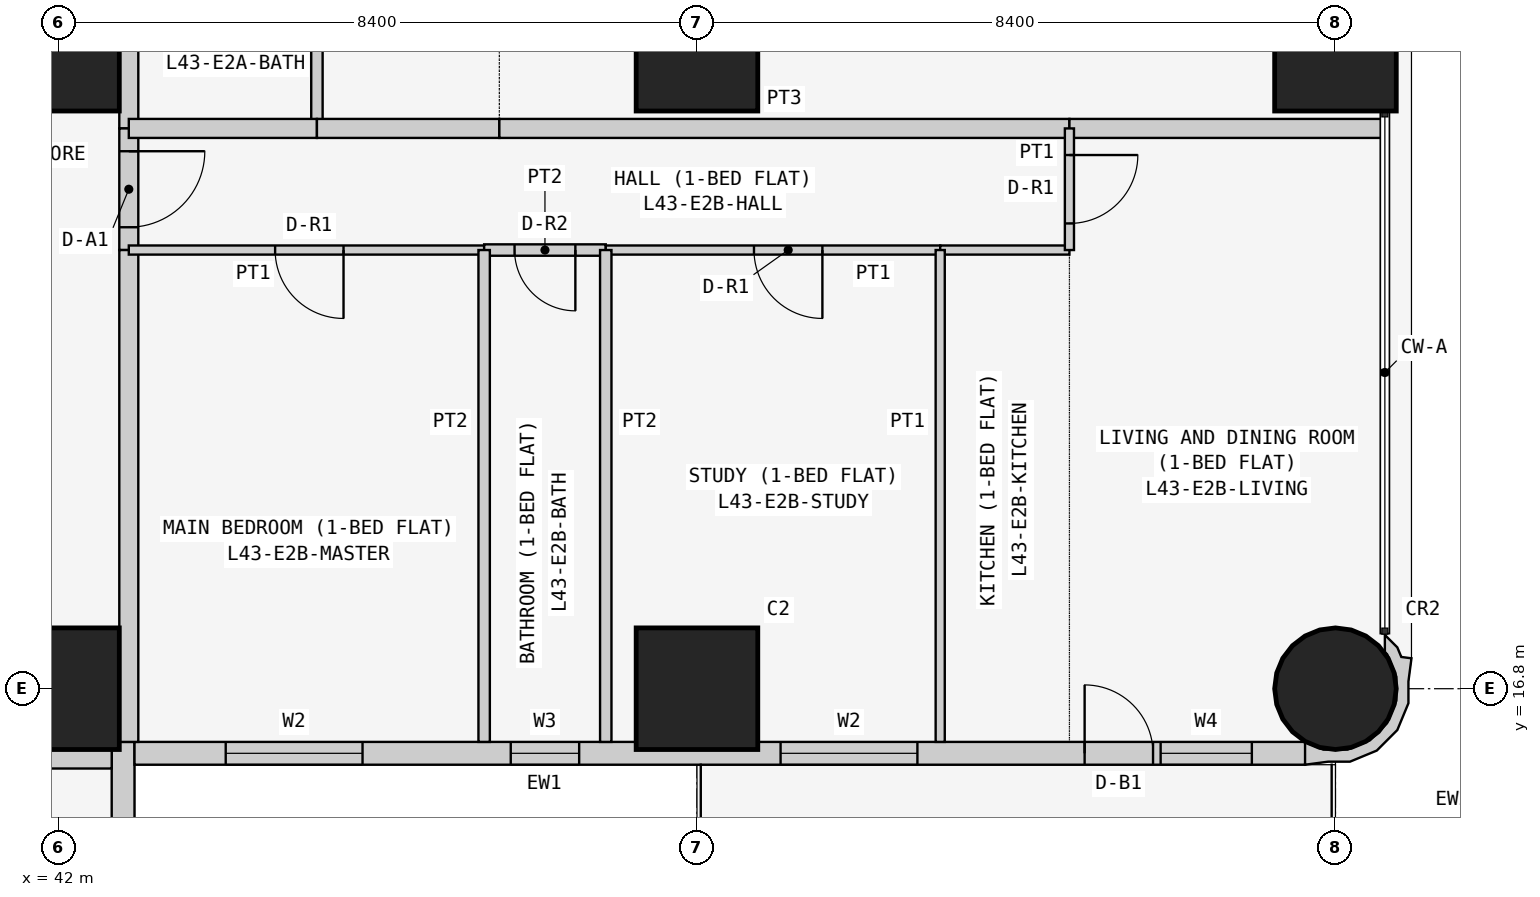
"""IFC4 building model, lengths in metres.
Left out: names, types, materials, properties, quantities, classifications, styles, units other than length and angle.
Written with IfcOpenShell. Run it as: python <this file> out.ifc"""

import sys

from ifc_helpers import new_model, si_unit, direction, frame, frame_2d, origin, origin_2d, place, context, subcontext, project, spatial, polyline, rectangle, circle, outline, extrude, element, fill, save


model = new_model("IFC4")
c1 = context("Model", 3, precision=1e-05, world=origin(), true_north=direction((0.0, 1.0)))
c2 = subcontext(c1, "Body", "Model", "MODEL_VIEW")
j1 = project(units=[si_unit("LENGTHUNIT", "METRE"), si_unit("PLANEANGLEUNIT", "RADIAN")], contexts=[c1])
p1 = place(None, origin())
s1 = spatial("IfcSite", under=j1, at=p1, CompositionType="ELEMENT")
p2 = place(p1, origin())
s2 = spatial("IfcBuilding", under=s1, at=p2, CompositionType="ELEMENT")
p3 = place(p2, frame((0.0, 0.0, 166.5)))
s3 = spatial("IfcBuildingStorey", under=s2, at=p3, CompositionType="ELEMENT", Elevation=166.5)
for number, where, z_axis, x_axis in (
    (1, (42.0, 16.8, 0.0), (0.0, 0.0, 1.0), (1.0, 0.0, 0.0)),
    (2, (42.0, 25.2, 0.0), (0.0, 0.0, 1.0), (1.0, 0.0, 0.0)),
    (3, (50.4, 16.8, 0.0), (0.0, 0.0, 1.0), (1.0, 0.0, 0.0)),
    (4, (50.4, 25.2, 0.0), (0.0, 0.0, 1.0), (1.0, 0.0, 0.0)),
):
    element("IfcColumn", number, at=place(p3, frame(where, z_axis=z_axis, x_axis=x_axis)), inside=s3, PredefinedType="COLUMN", context=c2, shape_type="SweptSolid", body=[
        extrude(rectangle(XDim=1.6, YDim=1.6, at=origin_2d()), origin(), (0.0, 0.0, 1.0), 3.6),
    ])
p4 = place(p3, frame((58.8, 16.8, 0.0), z_axis=(0.0, 0.0, 1.0), x_axis=(1.0, 0.0, 0.0)))
e5 = element("IfcColumn", 5, at=p4, inside=s3, PredefinedType="COLUMN", context=c2, shape_type="SweptSolid", body=[
    extrude(circle(Radius=0.8, at=origin_2d()), origin(), (0.0, 0.0, 1.0), 3.6),
])
p5 = place(p3, frame((58.8, 25.2, 0.0), z_axis=(0.0, 0.0, 1.0), x_axis=(1.0, 0.0, 0.0)))
e6 = element("IfcColumn", 6, at=p5, inside=s3, PredefinedType="COLUMN", context=c2, shape_type="SweptSolid", body=[
    extrude(rectangle(XDim=1.6, YDim=1.6, at=origin_2d()), origin(), (0.0, 0.0, 1.0), 3.6),
])
p6 = place(p3, frame((42.85, 8.8, 0.0), z_axis=(0.0, 0.0, 1.0), x_axis=(0.0, 1.0, 0.0)))
e7 = element("IfcWall", 7, at=p6, inside=s3, PredefinedType="SOLIDWALL", context=c2, shape_type="SweptSolid", body=[
    extrude(rectangle(XDim=7.3, YDim=0.3, at=frame_2d((3.65, 0.0))), origin(), (0.0, 0.0, 1.0), 3.45),
])
p7 = place(p6, frame((3.1, 0.0, 0.9)))
e8 = element("IfcOpeningElement", 8, at=p7, cuts=e7, PredefinedType="OPENING", context=c2, shape_type="SweptSolid", body=[
    extrude(rectangle(XDim=2.4, YDim=1.5, at=frame_2d((1.2, 0.75))), frame((0.0, 0.16, 0.0), z_axis=(0.0, -1.0, 0.0), x_axis=(1.0, 0.0, 0.0)), (0.0, 0.0, 1.0), 0.32),
])
p8 = place(p6, frame((0.75, 0.0, 0.9)))
e9 = element("IfcOpeningElement", 9, at=p8, cuts=e7, PredefinedType="OPENING", context=c2, shape_type="SweptSolid", body=[
    extrude(rectangle(XDim=1.2, YDim=1.5, at=frame_2d((0.6, 0.75))), frame((0.0, 0.16, 0.0), z_axis=(0.0, -1.0, 0.0), x_axis=(1.0, 0.0, 0.0)), (0.0, 0.0, 1.0), 0.32),
])
p9 = place(p3, frame((43.0, 15.95, 0.0), z_axis=(0.0, 0.0, 1.0), x_axis=(1.0, 0.0, 0.0)))
e10 = element("IfcWall", 10, at=p9, inside=s3, PredefinedType="SOLIDWALL", context=c2, shape_type="SweptSolid", body=[
    extrude(rectangle(XDim=15.4, YDim=0.3, at=frame_2d((7.7, 0.0))), origin(), (0.0, 0.0, 1.0), 3.45),
])
p10 = place(p9, frame((1.2, 0.0, 0.9)))
e11 = element("IfcOpeningElement", 11, at=p10, cuts=e10, PredefinedType="OPENING", context=c2, shape_type="SweptSolid", body=[
    extrude(rectangle(XDim=1.8, YDim=1.5, at=frame_2d((0.9, 0.75))), frame((0.0, 0.16, 0.0), z_axis=(0.0, -1.0, 0.0), x_axis=(1.0, 0.0, 0.0)), (0.0, 0.0, 1.0), 0.32),
])
p11 = place(p9, frame((4.95, 0.0, 1.5)))
e12 = element("IfcOpeningElement", 12, at=p11, cuts=e10, PredefinedType="OPENING", context=c2, shape_type="SweptSolid", body=[
    extrude(rectangle(XDim=0.9, YDim=0.7, at=frame_2d((0.45, 0.35))), frame((0.0, 0.16, 0.0), z_axis=(0.0, -1.0, 0.0), x_axis=(1.0, 0.0, 0.0)), (0.0, 0.0, 1.0), 0.32),
])
p12 = place(p9, frame((8.5, 0.0, 0.9)))
e13 = element("IfcOpeningElement", 13, at=p12, cuts=e10, PredefinedType="OPENING", context=c2, shape_type="SweptSolid", body=[
    extrude(rectangle(XDim=1.8, YDim=1.5, at=frame_2d((0.9, 0.75))), frame((0.0, 0.16, 0.0), z_axis=(0.0, -1.0, 0.0), x_axis=(1.0, 0.0, 0.0)), (0.0, 0.0, 1.0), 0.32),
])
p13 = place(p9, frame((12.5, 0.0, 0.0)))
e14 = element("IfcOpeningElement", 14, at=p13, cuts=e10, PredefinedType="OPENING", context=c2, shape_type="SweptSolid", body=[
    extrude(rectangle(XDim=0.9, YDim=2.4, at=frame_2d((0.45, 1.2))), frame((0.0, 0.16, 0.0), z_axis=(0.0, -1.0, 0.0), x_axis=(1.0, 0.0, 0.0)), (0.0, 0.0, 1.0), 0.32),
])
p14 = place(p9, frame((13.5, 0.0, 0.9)))
e15 = element("IfcOpeningElement", 15, at=p14, cuts=e10, PredefinedType="OPENING", context=c2, shape_type="SweptSolid", body=[
    extrude(rectangle(XDim=1.2, YDim=1.5, at=frame_2d((0.6, 0.75))), frame((0.0, 0.16, 0.0), z_axis=(0.0, -1.0, 0.0), x_axis=(1.0, 0.0, 0.0)), (0.0, 0.0, 1.0), 0.32),
])
p15 = place(p3, frame((58.473, 15.983, 0.0), z_axis=(0.0, 0.0, 1.0), x_axis=(0.93923434088, -0.343276641956, 0.0)))
e16 = element("IfcWall", 16, at=p15, inside=s3, PredefinedType="SOLIDWALL", context=c2, shape_type="SweptSolid", body=[
    extrude(outline(polyline([(0.828, 1.599), (0.697, 1.569), (0.604, 1.67), (0.394, 1.767), (0.471, 1.556), (0.508, 1.539), (0.724, 1.304), (0.834, 1.005), (0.82, 0.686), (0.686, 0.397), (0.451, 0.182), (0.152, 0.073), (-0.116, 0.084), (-0.127, 0.078), (-0.146, 0.071), (-0.006, -0.197), (0.266, -0.055), (0.535, 0.044), (0.817, 0.302), (0.978, 0.648), (0.994, 1.03), (0.895, 1.3), (0.828, 1.599)])), origin(), (0.0, 0.0, 1.0), 3.45),
])
p16 = place(p3, frame((42.925, 26.8, 0.0), z_axis=(0.0, 0.0, 1.0), x_axis=(0.0, -1.0, 0.0)))
e17 = element("IfcWall", 17, at=p16, inside=s3, PredefinedType="PARTITIONING", context=c2, shape_type="SweptSolid", body=[
    extrude(rectangle(XDim=2.629, YDim=0.25, at=frame_2d((1.314, 0.0))), origin(), (0.0, 0.0, 1.0), 3.45),
])
p17 = place(p3, frame((42.925, 24.171, 0.0), z_axis=(0.0, 0.0, 1.0), x_axis=(0.0, -1.0, 0.0)))
e18 = element("IfcWall", 18, at=p17, inside=s3, PredefinedType="PARTITIONING", context=c2, shape_type="SweptSolid", body=[
    extrude(rectangle(XDim=1.6, YDim=0.25, at=frame_2d((0.8, 0.0))), origin(), (0.0, 0.0, 1.0), 3.45),
])
p18 = place(p17, frame((0.3, 0.0, 0.0)))
e19 = element("IfcOpeningElement", 19, at=p18, cuts=e18, PredefinedType="OPENING", context=c2, shape_type="SweptSolid", body=[
    extrude(rectangle(XDim=1.0, YDim=2.1, at=frame_2d((0.5, 1.05))), frame((0.0, 0.135, 0.0), z_axis=(0.0, -1.0, 0.0), x_axis=(1.0, 0.0, 0.0)), (0.0, 0.0, 1.0), 0.27),
])
p19 = place(p3, frame((42.925, 22.571, 0.0), z_axis=(0.0, 0.0, 1.0), x_axis=(0.0, -1.0, 0.0)))
e20 = element("IfcWall", 20, at=p19, inside=s3, PredefinedType="PARTITIONING", context=c2, shape_type="SweptSolid", body=[
    extrude(rectangle(XDim=6.471, YDim=0.25, at=frame_2d((3.235, 0.0))), origin(), (0.0, 0.0, 1.0), 3.45),
])
p20 = place(p3, frame((42.7, 15.875, 0.0), z_axis=(0.0, 0.0, 1.0), x_axis=(-1.0, 0.0, 0.0)))
e21 = element("IfcWall", 21, at=p20, inside=s3, PredefinedType="PARTITIONING", context=c2, shape_type="SweptSolid", body=[
    extrude(rectangle(XDim=6.871, YDim=0.25, at=frame_2d((3.436, 0.0))), origin(), (0.0, 0.0, 1.0), 3.45),
])
p21 = place(p3, frame((45.4, 26.8, 0.0), z_axis=(0.0, 0.0, 1.0), x_axis=(0.0, -1.0, 0.0)))
e22 = element("IfcWall", 22, at=p21, inside=s3, PredefinedType="PARTITIONING", context=c2, shape_type="SweptSolid", body=[
    extrude(rectangle(XDim=2.629, YDim=0.15, at=frame_2d((1.314, 0.0))), origin(), (0.0, 0.0, 1.0), 3.45),
])
p22 = place(p3, frame((45.4, 24.171, 0.0), z_axis=(0.0, 0.0, 1.0), x_axis=(-1.0, 0.0, 0.0)))
e23 = element("IfcWall", 23, at=p22, inside=s3, PredefinedType="PARTITIONING", context=c2, shape_type="SweptSolid", body=[
    extrude(rectangle(XDim=2.475, YDim=0.25, at=frame_2d((1.237, 0.0))), origin(), (0.0, 0.0, 1.0), 3.45),
])
p23 = place(p3, frame((47.8, 24.171, 0.0), z_axis=(0.0, 0.0, 1.0), x_axis=(-1.0, 0.0, 0.0)))
e24 = element("IfcWall", 24, at=p23, inside=s3, PredefinedType="PARTITIONING", context=c2, shape_type="SweptSolid", body=[
    extrude(rectangle(XDim=2.4, YDim=0.25, at=frame_2d((1.2, 0.0))), origin(), (0.0, 0.0, 1.0), 3.45),
])
p24 = place(p3, frame((55.3, 24.171, 0.0), z_axis=(0.0, 0.0, 1.0), x_axis=(-1.0, 0.0, 0.0)))
e25 = element("IfcWall", 25, at=p24, inside=s3, PredefinedType="PARTITIONING", context=c2, shape_type="SweptSolid", body=[
    extrude(rectangle(XDim=7.5, YDim=0.25, at=frame_2d((3.75, 0.0))), origin(), (0.0, 0.0, 1.0), 3.45),
])
p25 = place(p3, frame((59.45, 24.171, 0.0), z_axis=(0.0, 0.0, 1.0), x_axis=(-1.0, 0.0, 0.0)))
e26 = element("IfcWall", 26, at=p25, inside=s3, PredefinedType="PARTITIONING", context=c2, shape_type="SweptSolid", body=[
    extrude(rectangle(XDim=4.15, YDim=0.25, at=frame_2d((2.075, 0.0))), origin(), (0.0, 0.0, 1.0), 3.45),
])
p26 = place(p3, frame((47.6, 22.571, 0.0), z_axis=(0.0, 0.0, 1.0), x_axis=(-1.0, 0.0, 0.0)))
e27 = element("IfcWall", 27, at=p26, inside=s3, PredefinedType="PARTITIONING", context=c2, shape_type="SweptSolid", body=[
    extrude(rectangle(XDim=4.675, YDim=0.12, at=frame_2d((2.337, 0.0))), origin(), (0.0, 0.0, 1.0), 3.45),
])
p27 = place(p26, frame((1.85, 0.0, 0.0)))
e28 = element("IfcOpeningElement", 28, at=p27, cuts=e27, PredefinedType="OPENING", context=c2, shape_type="SweptSolid", body=[
    extrude(rectangle(XDim=0.9, YDim=2.1, at=frame_2d((0.45, 1.05))), frame((0.0, 0.07, 0.0), z_axis=(0.0, -1.0, 0.0), x_axis=(1.0, 0.0, 0.0)), (0.0, 0.0, 1.0), 0.14),
])
p28 = place(p3, frame((49.2, 22.571, 0.0), z_axis=(0.0, 0.0, 1.0), x_axis=(-1.0, 0.0, 0.0)))
e29 = element("IfcWall", 29, at=p28, inside=s3, PredefinedType="PARTITIONING", context=c2, shape_type="SweptSolid", body=[
    extrude(rectangle(XDim=1.6, YDim=0.15, at=frame_2d((0.8, 0.0))), origin(), (0.0, 0.0, 1.0), 3.45),
])
p29 = place(p28, frame((0.4, 0.0, 0.0)))
e30 = element("IfcOpeningElement", 30, at=p29, cuts=e29, PredefinedType="OPENING", context=c2, shape_type="SweptSolid", body=[
    extrude(rectangle(XDim=0.8, YDim=2.1, at=frame_2d((0.4, 1.05))), frame((0.0, 0.085, 0.0), z_axis=(0.0, -1.0, 0.0), x_axis=(1.0, 0.0, 0.0)), (0.0, 0.0, 1.0), 0.17),
])
p30 = place(p3, frame((53.6, 22.571, 0.0), z_axis=(0.0, 0.0, 1.0), x_axis=(-1.0, 0.0, 0.0)))
e31 = element("IfcWall", 31, at=p30, inside=s3, PredefinedType="PARTITIONING", context=c2, shape_type="SweptSolid", body=[
    extrude(rectangle(XDim=4.4, YDim=0.12, at=frame_2d((2.2, 0.0))), origin(), (0.0, 0.0, 1.0), 3.45),
])
p31 = place(p30, frame((1.55, 0.0, 0.0)))
e32 = element("IfcOpeningElement", 32, at=p31, cuts=e31, PredefinedType="OPENING", context=c2, shape_type="SweptSolid", body=[
    extrude(rectangle(XDim=0.9, YDim=2.1, at=frame_2d((0.45, 1.05))), frame((0.0, 0.07, 0.0), z_axis=(0.0, -1.0, 0.0), x_axis=(1.0, 0.0, 0.0)), (0.0, 0.0, 1.0), 0.14),
])
p32 = place(p3, frame((55.3, 22.571, 0.0), z_axis=(0.0, 0.0, 1.0), x_axis=(-1.0, 0.0, 0.0)))
e33 = element("IfcWall", 33, at=p32, inside=s3, PredefinedType="PARTITIONING", context=c2, shape_type="SweptSolid", body=[
    extrude(rectangle(XDim=1.7, YDim=0.12, at=frame_2d((0.85, 0.0))), origin(), (0.0, 0.0, 1.0), 3.45),
])
p33 = place(p3, frame((55.3, 24.171, 0.0), z_axis=(0.0, 0.0, 1.0), x_axis=(0.0, -1.0, 0.0)))
e34 = element("IfcWall", 34, at=p33, inside=s3, PredefinedType="PARTITIONING", context=c2, shape_type="SweptSolid", body=[
    extrude(rectangle(XDim=1.6, YDim=0.12, at=frame_2d((0.8, 0.0))), origin(), (0.0, 0.0, 1.0), 3.45),
])
p34 = place(p33, frame((0.35, 0.0, 0.0)))
e35 = element("IfcOpeningElement", 35, at=p34, cuts=e34, PredefinedType="OPENING", context=c2, shape_type="SweptSolid", body=[
    extrude(rectangle(XDim=0.9, YDim=2.1, at=frame_2d((0.45, 1.05))), frame((0.0, 0.07, 0.0), z_axis=(0.0, -1.0, 0.0), x_axis=(1.0, 0.0, 0.0)), (0.0, 0.0, 1.0), 0.14),
])
for number, where, z_axis, x_axis in (
    (36, (47.6, 22.571, 0.0), (0.0, 0.0, 1.0), (0.0, -1.0, 0.0)),
    (37, (49.2, 22.571, 0.0), (0.0, 0.0, 1.0), (0.0, -1.0, 0.0)),
):
    element("IfcWall", number, at=place(p3, frame(where, z_axis=z_axis, x_axis=x_axis)), inside=s3, PredefinedType="PARTITIONING", context=c2, shape_type="SweptSolid", body=[
        extrude(rectangle(XDim=6.471, YDim=0.15, at=frame_2d((3.235, 0.0))), origin(), (0.0, 0.0, 1.0), 3.45),
    ])
p35 = place(p3, frame((53.6, 22.571, 0.0), z_axis=(0.0, 0.0, 1.0), x_axis=(0.0, -1.0, 0.0)))
e38 = element("IfcWall", 38, at=p35, inside=s3, PredefinedType="PARTITIONING", context=c2, shape_type="SweptSolid", body=[
    extrude(rectangle(XDim=6.471, YDim=0.12, at=frame_2d((3.235, 0.0))), origin(), (0.0, 0.0, 1.0), 3.45),
])
p36 = place(p10, origin())
e39 = element("IfcWindow", 39, at=p36, inside=s3, PartitioningType="SINGLE_PANEL", PredefinedType="WINDOW", context=c2, shape_type="SweptSolid", body=[
    extrude(rectangle(XDim=1.8, YDim=1.5, at=frame_2d((0.9, 0.75))), frame((0.0, 0.03, 0.0), z_axis=(0.0, -1.0, 0.0), x_axis=(1.0, 0.0, 0.0)), (0.0, 0.0, 1.0), 0.06),
])
fill(e11, e39)
p37 = place(p11, origin())
e40 = element("IfcWindow", 40, at=p37, inside=s3, PartitioningType="SINGLE_PANEL", PredefinedType="WINDOW", context=c2, shape_type="SweptSolid", body=[
    extrude(rectangle(XDim=0.9, YDim=0.7, at=frame_2d((0.45, 0.35))), frame((0.0, 0.03, 0.0), z_axis=(0.0, -1.0, 0.0), x_axis=(1.0, 0.0, 0.0)), (0.0, 0.0, 1.0), 0.06),
])
fill(e12, e40)
p38 = place(p12, origin())
e41 = element("IfcWindow", 41, at=p38, inside=s3, PartitioningType="SINGLE_PANEL", PredefinedType="WINDOW", context=c2, shape_type="SweptSolid", body=[
    extrude(rectangle(XDim=1.8, YDim=1.5, at=frame_2d((0.9, 0.75))), frame((0.0, 0.03, 0.0), z_axis=(0.0, -1.0, 0.0), x_axis=(1.0, 0.0, 0.0)), (0.0, 0.0, 1.0), 0.06),
])
fill(e13, e41)
p39 = place(p13, origin())
e42 = element("IfcDoor", 42, at=p39, inside=s3, OperationType="SINGLE_SWING_LEFT", PredefinedType="DOOR", context=c2, shape_type="SweptSolid", body=[
    extrude(rectangle(XDim=0.9, YDim=2.4, at=frame_2d((0.45, 1.2))), frame((0.0, 0.025, 0.0), z_axis=(0.0, -1.0, 0.0), x_axis=(1.0, 0.0, 0.0)), (0.0, 0.0, 1.0), 0.05),
])
fill(e14, e42)
p40 = place(p14, origin())
e43 = element("IfcWindow", 43, at=p40, inside=s3, PartitioningType="SINGLE_PANEL", PredefinedType="WINDOW", context=c2, shape_type="SweptSolid", body=[
    extrude(rectangle(XDim=1.2, YDim=1.5, at=frame_2d((0.6, 0.75))), frame((0.0, 0.03, 0.0), z_axis=(0.0, -1.0, 0.0), x_axis=(1.0, 0.0, 0.0)), (0.0, 0.0, 1.0), 0.06),
])
fill(e15, e43)
p41 = place(p18, origin())
e44 = element("IfcDoor", 44, at=p41, inside=s3, OperationType="SINGLE_SWING_LEFT", PredefinedType="DOOR", context=c2, shape_type="SweptSolid", body=[
    extrude(rectangle(XDim=1.0, YDim=2.1, at=frame_2d((0.5, 1.05))), frame((0.0, 0.025, 0.0), z_axis=(0.0, -1.0, 0.0), x_axis=(1.0, 0.0, 0.0)), (0.0, 0.0, 1.0), 0.05),
])
fill(e19, e44)
p42 = place(p27, origin())
e45 = element("IfcDoor", 45, at=p42, inside=s3, OperationType="SINGLE_SWING_LEFT", PredefinedType="DOOR", context=c2, shape_type="SweptSolid", body=[
    extrude(rectangle(XDim=0.9, YDim=2.1, at=frame_2d((0.45, 1.05))), frame((0.0, 0.025, 0.0), z_axis=(0.0, -1.0, 0.0), x_axis=(1.0, 0.0, 0.0)), (0.0, 0.0, 1.0), 0.05),
])
fill(e28, e45)
p43 = place(p29, origin())
e46 = element("IfcDoor", 46, at=p43, inside=s3, OperationType="SINGLE_SWING_LEFT", PredefinedType="DOOR", context=c2, shape_type="SweptSolid", body=[
    extrude(rectangle(XDim=0.8, YDim=2.1, at=frame_2d((0.4, 1.05))), frame((0.0, 0.025, 0.0), z_axis=(0.0, -1.0, 0.0), x_axis=(1.0, 0.0, 0.0)), (0.0, 0.0, 1.0), 0.05),
])
fill(e30, e46)
p44 = place(p31, origin())
e47 = element("IfcDoor", 47, at=p44, inside=s3, OperationType="SINGLE_SWING_LEFT", PredefinedType="DOOR", context=c2, shape_type="SweptSolid", body=[
    extrude(rectangle(XDim=0.9, YDim=2.1, at=frame_2d((0.45, 1.05))), frame((0.0, 0.025, 0.0), z_axis=(0.0, -1.0, 0.0), x_axis=(1.0, 0.0, 0.0)), (0.0, 0.0, 1.0), 0.05),
])
fill(e32, e47)
p45 = place(p34, origin())
e48 = element("IfcDoor", 48, at=p45, inside=s3, OperationType="SINGLE_SWING_LEFT", PredefinedType="DOOR", context=c2, shape_type="SweptSolid", body=[
    extrude(rectangle(XDim=0.9, YDim=2.1, at=frame_2d((0.45, 1.05))), frame((0.0, 0.025, 0.0), z_axis=(0.0, -1.0, 0.0), x_axis=(1.0, 0.0, 0.0)), (0.0, 0.0, 1.0), 0.05),
])
fill(e35, e48)
save(model, sys.argv[1])
